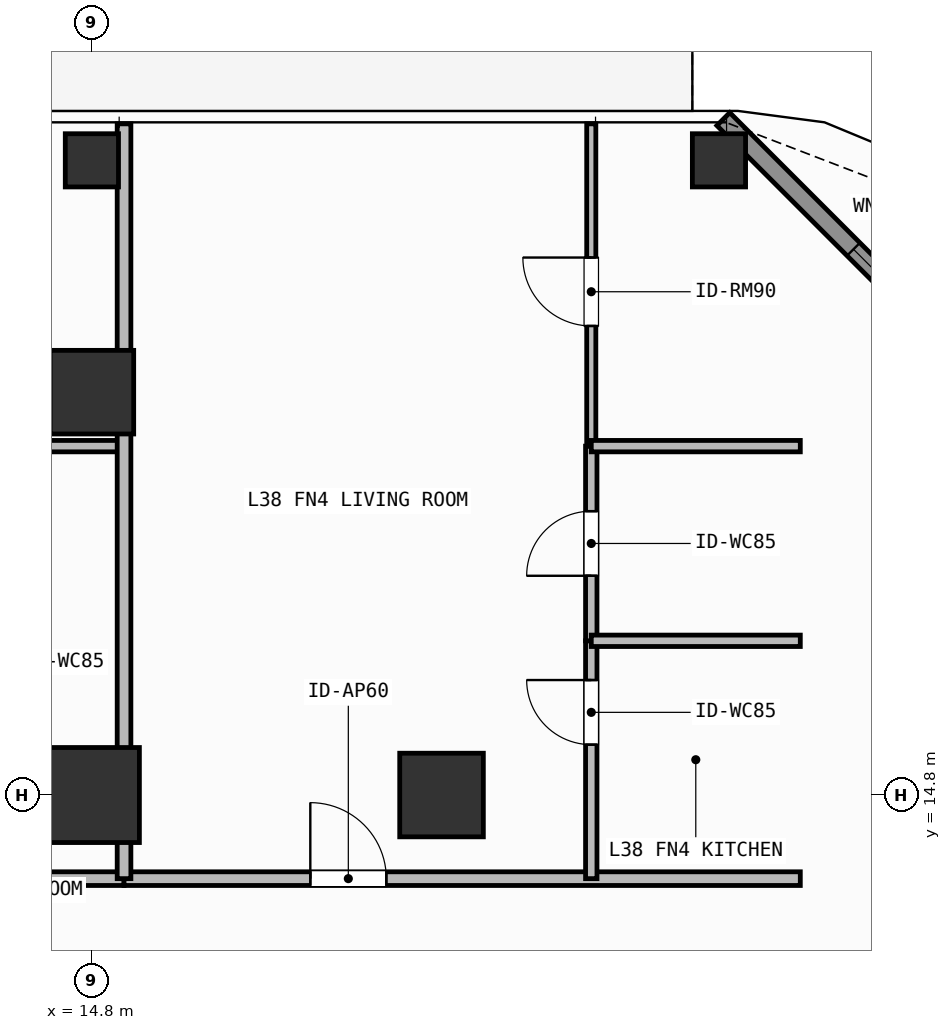
"""IFC4 building model, lengths in metres.
Left out: names, types, materials, properties, quantities, classifications, styles, units other than length and angle.
Written with IfcOpenShell. Run it as: python <this file> out.ifc"""

import sys

from ifc_helpers import new_model, si_unit, direction, frame, frame_2d, origin, origin_2d, place, context, subcontext, project, spatial, rectangle, hollow_rectangle, extrude, element, fill, save


model = new_model("IFC4")
c1 = context("Model", 3, precision=1e-05, world=origin(), true_north=direction((0.0, 1.0)))
c2 = subcontext(c1, "Body", "Model", "MODEL_VIEW")
j1 = project(units=[si_unit("LENGTHUNIT", "METRE"), si_unit("PLANEANGLEUNIT", "RADIAN")], contexts=[c1])
p1 = place(None, origin())
s1 = spatial("IfcSite", under=j1, at=p1, CompositionType="ELEMENT")
p2 = place(p1, origin())
s2 = spatial("IfcBuilding", under=s1, at=p2, CompositionType="ELEMENT")
p3 = place(p2, frame((0.0, 0.0, 152.4)))
s3 = spatial("IfcBuildingStorey", under=s2, at=p3, CompositionType="ELEMENT", Elevation=152.4)
p4 = place(p3, frame((14.8, 14.8, 0.0), z_axis=(0.0, 0.0, 1.0), x_axis=(1.0, 0.0, 0.0)))
e1 = element("IfcColumn", 1, at=p4, inside=s3, PredefinedType="COLUMN", context=c2, shape_type="SweptSolid", body=[
    extrude(rectangle(XDim=1.25, YDim=1.25, at=origin_2d()), origin(), (0.0, 0.0, 1.0), 3.9),
])
for number, where, z_axis, x_axis in (
    (2, (19.4, 14.8, 0.0), (0.0, 0.0, 1.0), (1.0, 0.0, 0.0)),
    (3, (14.8, 20.1, 0.0), (0.0, 0.0, 1.0), (1.0, 0.0, 0.0)),
):
    element("IfcColumn", number, at=place(p3, frame(where, z_axis=z_axis, x_axis=x_axis)), inside=s3, PredefinedType="COLUMN", context=c2, shape_type="SweptSolid", body=[
        extrude(rectangle(XDim=1.1, YDim=1.1, at=origin_2d()), origin(), (0.0, 0.0, 1.0), 3.9),
    ])
for number, where, z_axis, x_axis in (
    (4, (23.05, 23.15, 0.0), (0.0, 0.0, 1.0), (1.0, 0.0, 0.0)),
    (5, (14.8, 23.15, 0.0), (0.0, 0.0, 1.0), (1.0, 0.0, 0.0)),
):
    element("IfcColumn", number, at=place(p3, frame(where, z_axis=z_axis, x_axis=x_axis)), inside=s3, PredefinedType="COLUMN", context=c2, shape_type="SweptSolid", body=[
        extrude(hollow_rectangle(XDim=0.7, YDim=0.7, WallThickness=0.032, at=origin_2d()), origin(), (0.0, 0.0, 1.0), 3.9),
    ])
p5 = place(p3, frame((23.108, 23.692, 0.0), z_axis=(0.0, 0.0, 1.0), x_axis=(0.707087534163, -0.707126027686, 0.0)))
e6 = element("IfcWall", 6, at=p5, inside=s3, PredefinedType="SOLIDWALL", context=c2, shape_type="SweptSolid", body=[
    extrude(rectangle(XDim=6.342, YDim=0.24, at=frame_2d((3.171, 0.0))), origin(), (0.0, 0.0, 1.0), 3.6),
])
p6 = place(p5, frame((2.421, 0.0, 0.8)))
e7 = element("IfcOpeningElement", 7, at=p6, cuts=e6, PredefinedType="OPENING", context=c2, shape_type="SweptSolid", body=[
    extrude(rectangle(XDim=1.5, YDim=1.85, at=frame_2d((0.75, 0.925))), frame((0.0, 0.13, 0.0), z_axis=(0.0, -1.0, 0.0), x_axis=(1.0, 0.0, 0.0)), (0.0, 0.0, 1.0), 0.26),
])
p7 = place(p3, frame((3.9, 13.7, 0.0), z_axis=(0.0, 0.0, 1.0), x_axis=(1.0, 0.0, 0.0)))
e8 = element("IfcWall", 8, at=p7, inside=s3, PredefinedType="PARTITIONING", context=c2, shape_type="SweptSolid", body=[
    extrude(rectangle(XDim=11.323, YDim=0.18, at=frame_2d((5.662, 0.0))), origin(), (0.0, 0.0, 1.0), 3.6),
])
p8 = place(p7, frame((5.519, 0.0, 0.0)))
e9 = element("IfcOpeningElement", 9, at=p8, cuts=e8, PredefinedType="OPENING", context=c2, shape_type="SweptSolid", body=[
    extrude(rectangle(XDim=1.0, YDim=2.2, at=frame_2d((0.5, 1.1))), frame((0.0, 0.1, 0.0), z_axis=(0.0, -1.0, 0.0), x_axis=(1.0, 0.0, 0.0)), (0.0, 0.0, 1.0), 0.2),
])
p9 = place(p3, frame((15.223, 13.7, 0.0), z_axis=(0.0, 0.0, 1.0), x_axis=(1.0, 0.0, 0.0)))
e10 = element("IfcWall", 10, at=p9, inside=s3, PredefinedType="PARTITIONING", context=c2, shape_type="SweptSolid", body=[
    extrude(rectangle(XDim=8.897, YDim=0.18, at=frame_2d((4.449, 0.0))), origin(), (0.0, 0.0, 1.0), 3.6),
])
p10 = place(p9, frame((2.451, 0.0, 0.0)))
e11 = element("IfcOpeningElement", 11, at=p10, cuts=e10, PredefinedType="OPENING", context=c2, shape_type="SweptSolid", body=[
    extrude(rectangle(XDim=1.0, YDim=2.2, at=frame_2d((0.5, 1.1))), frame((0.0, 0.1, 0.0), z_axis=(0.0, -1.0, 0.0), x_axis=(1.0, 0.0, 0.0)), (0.0, 0.0, 1.0), 0.2),
])
p11 = place(p3, frame((21.37, 13.7, 0.0), z_axis=(0.0, 0.0, 1.0), x_axis=(0.0, 1.0, 0.0)))
e12 = element("IfcWall", 12, at=p11, inside=s3, PredefinedType="PARTITIONING", context=c2, shape_type="SweptSolid", body=[
    extrude(rectangle(XDim=3.129, YDim=0.15, at=frame_2d((1.564, 0.0))), origin(), (0.0, 0.0, 1.0), 3.6),
])
p12 = place(p11, frame((1.763, 0.0, 0.0)))
e13 = element("IfcOpeningElement", 13, at=p12, cuts=e12, PredefinedType="OPENING", context=c2, shape_type="SweptSolid", body=[
    extrude(rectangle(XDim=0.85, YDim=2.1, at=frame_2d((0.425, 1.05))), frame((0.0, 0.085, 0.0), z_axis=(0.0, -1.0, 0.0), x_axis=(1.0, 0.0, 0.0)), (0.0, 0.0, 1.0), 0.17),
])
p13 = place(p3, frame((21.37, 16.829, 0.0), z_axis=(0.0, 0.0, 1.0), x_axis=(0.0, 1.0, 0.0)))
e14 = element("IfcWall", 14, at=p13, inside=s3, PredefinedType="PARTITIONING", context=c2, shape_type="SweptSolid", body=[
    extrude(rectangle(XDim=2.561, YDim=0.15, at=frame_2d((1.28, 0.0))), origin(), (0.0, 0.0, 1.0), 3.6),
])
p14 = place(p13, frame((0.855, 0.0, 0.0)))
e15 = element("IfcOpeningElement", 15, at=p14, cuts=e14, PredefinedType="OPENING", context=c2, shape_type="SweptSolid", body=[
    extrude(rectangle(XDim=0.85, YDim=2.1, at=frame_2d((0.425, 1.05))), frame((0.0, 0.085, 0.0), z_axis=(0.0, -1.0, 0.0), x_axis=(1.0, 0.0, 0.0)), (0.0, 0.0, 1.0), 0.17),
])
p15 = place(p3, frame((21.37, 19.39, 0.0), z_axis=(0.0, 0.0, 1.0), x_axis=(0.0, 1.0, 0.0)))
e16 = element("IfcWall", 16, at=p15, inside=s3, PredefinedType="PARTITIONING", context=c2, shape_type="SweptSolid", body=[
    extrude(rectangle(XDim=4.24, YDim=0.12, at=frame_2d((2.12, 0.0))), origin(), (0.0, 0.0, 1.0), 3.6),
])
p16 = place(p15, frame((1.581, 0.0, 0.0)))
e17 = element("IfcOpeningElement", 17, at=p16, cuts=e16, PredefinedType="OPENING", context=c2, shape_type="SweptSolid", body=[
    extrude(rectangle(XDim=0.9, YDim=2.1, at=frame_2d((0.45, 1.05))), frame((0.0, 0.07, 0.0), z_axis=(0.0, -1.0, 0.0), x_axis=(1.0, 0.0, 0.0)), (0.0, 0.0, 1.0), 0.14),
])
p17 = place(p3, frame((11.69, 19.39, 0.0), z_axis=(0.0, 0.0, 1.0), x_axis=(1.0, 0.0, 0.0)))
e18 = element("IfcWall", 18, at=p17, inside=s3, PredefinedType="PARTITIONING", context=c2, shape_type="SweptSolid", body=[
    extrude(rectangle(XDim=3.533, YDim=0.15, at=frame_2d((1.767, 0.0))), origin(), (0.0, 0.0, 1.0), 3.6),
])
for number, where, z_axis, x_axis in (
    (19, (21.37, 16.829, 0.0), (0.0, 0.0, 1.0), (1.0, 0.0, 0.0)),
    (20, (21.37, 19.39, 0.0), (0.0, 0.0, 1.0), (1.0, 0.0, 0.0)),
):
    element("IfcWall", number, at=place(p3, frame(where, z_axis=z_axis, x_axis=x_axis)), inside=s3, PredefinedType="PARTITIONING", context=c2, shape_type="SweptSolid", body=[
        extrude(rectangle(XDim=2.75, YDim=0.15, at=frame_2d((1.375, 0.0))), origin(), (0.0, 0.0, 1.0), 3.6),
    ])
p18 = place(p3, frame((15.223, 13.7, 0.0), z_axis=(0.0, 0.0, 1.0), x_axis=(0.0, 1.0, 0.0)))
e21 = element("IfcWall", 21, at=p18, inside=s3, PredefinedType="PARTITIONING", context=c2, shape_type="SweptSolid", body=[
    extrude(rectangle(XDim=9.93, YDim=0.18, at=frame_2d((4.965, 0.0))), origin(), (0.0, 0.0, 1.0), 3.6),
])
p19 = place(p6, origin())
e22 = element("IfcWindow", 22, at=p19, inside=s3, PartitioningType="SINGLE_PANEL", PredefinedType="WINDOW", context=c2, shape_type="SweptSolid", body=[
    extrude(rectangle(XDim=1.5, YDim=1.85, at=frame_2d((0.75, 0.925))), frame((0.0, 0.03, 0.0), z_axis=(0.0, -1.0, 0.0), x_axis=(1.0, 0.0, 0.0)), (0.0, 0.0, 1.0), 0.06),
])
fill(e7, e22)
p20 = place(p10, origin())
e23 = element("IfcDoor", 23, at=p20, inside=s3, OperationType="SINGLE_SWING_LEFT", PredefinedType="DOOR", context=c2, shape_type="SweptSolid", body=[
    extrude(rectangle(XDim=1.0, YDim=2.2, at=frame_2d((0.5, 1.1))), frame((0.0, 0.025, 0.0), z_axis=(0.0, -1.0, 0.0), x_axis=(1.0, 0.0, 0.0)), (0.0, 0.0, 1.0), 0.05),
])
fill(e11, e23)
p21 = place(p12, origin())
e24 = element("IfcDoor", 24, at=p21, inside=s3, OperationType="SINGLE_SWING_RIGHT", PredefinedType="DOOR", context=c2, shape_type="SweptSolid", body=[
    extrude(rectangle(XDim=0.85, YDim=2.1, at=frame_2d((0.425, 1.05))), frame((0.0, 0.025, 0.0), z_axis=(0.0, -1.0, 0.0), x_axis=(1.0, 0.0, 0.0)), (0.0, 0.0, 1.0), 0.05),
])
fill(e13, e24)
p22 = place(p14, origin())
e25 = element("IfcDoor", 25, at=p22, inside=s3, OperationType="SINGLE_SWING_LEFT", PredefinedType="DOOR", context=c2, shape_type="SweptSolid", body=[
    extrude(rectangle(XDim=0.85, YDim=2.1, at=frame_2d((0.425, 1.05))), frame((0.0, 0.025, 0.0), z_axis=(0.0, -1.0, 0.0), x_axis=(1.0, 0.0, 0.0)), (0.0, 0.0, 1.0), 0.05),
])
fill(e15, e25)
p23 = place(p16, origin())
e26 = element("IfcDoor", 26, at=p23, inside=s3, OperationType="SINGLE_SWING_RIGHT", PredefinedType="DOOR", context=c2, shape_type="SweptSolid", body=[
    extrude(rectangle(XDim=0.9, YDim=2.1, at=frame_2d((0.45, 1.05))), frame((0.0, 0.025, 0.0), z_axis=(0.0, -1.0, 0.0), x_axis=(1.0, 0.0, 0.0)), (0.0, 0.0, 1.0), 0.05),
])
fill(e17, e26)
save(model, sys.argv[1])
